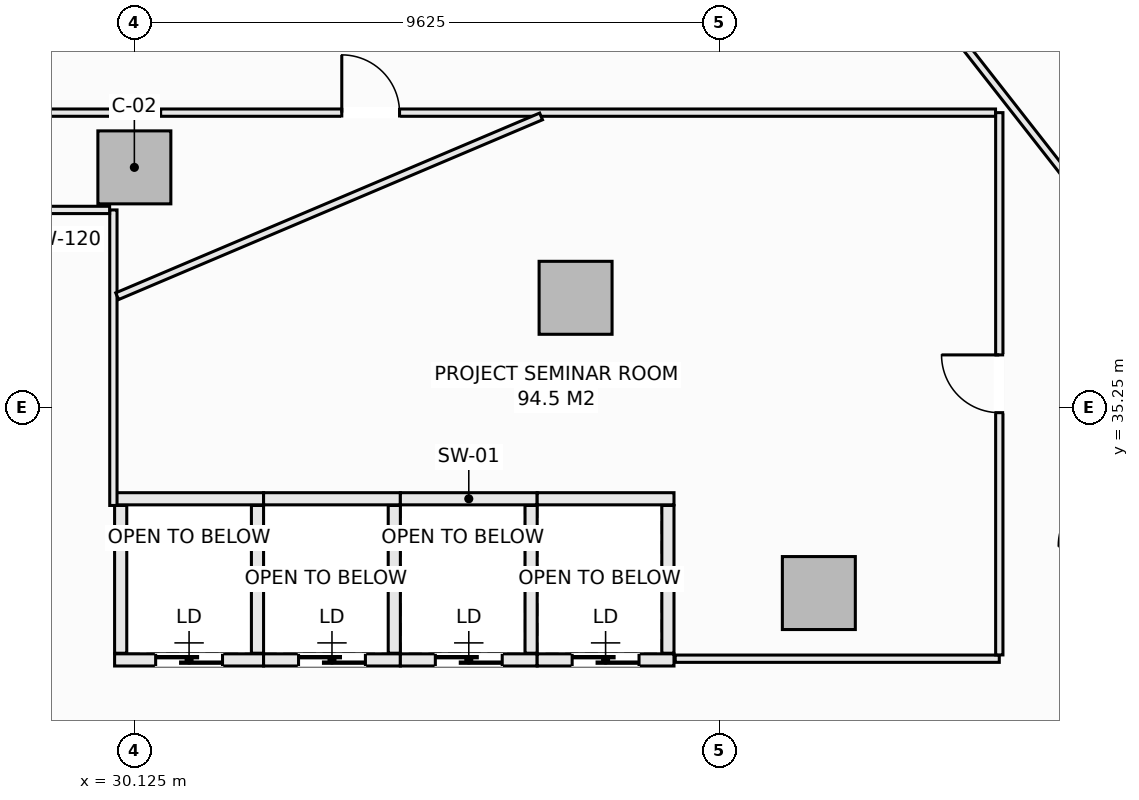
"""IFC4 building model, lengths in metres.
Left out: names, types, materials, properties, quantities, classifications, styles, units other than length and angle.
Written with IfcOpenShell. Run it as: python <this file> out.ifc"""

import sys

from ifc_helpers import new_model, si_unit, direction, frame, frame_2d, origin, origin_2d, place, context, subcontext, project, spatial, rectangle, extrude, element, fill, save


model = new_model("IFC4")
c1 = context("Model", 3, precision=1e-05, world=origin(), true_north=direction((0.0, 1.0)))
c2 = subcontext(c1, "Body", "Model", "MODEL_VIEW")
j1 = project(units=[si_unit("LENGTHUNIT", "METRE"), si_unit("PLANEANGLEUNIT", "RADIAN")], contexts=[c1])
p1 = place(None, origin())
s1 = spatial("IfcSite", under=j1, at=p1, CompositionType="ELEMENT")
p2 = place(p1, origin())
s2 = spatial("IfcBuilding", under=s1, at=p2, CompositionType="ELEMENT")
p3 = place(p2, frame((0.0, 0.0, 41.9)))
s3 = spatial("IfcBuildingStorey", under=s2, at=p3, CompositionType="ELEMENT", Elevation=41.9)
for number, where, z_axis, x_axis in (
    (1, (41.382, 32.199, -0.28), (0.0, 0.0, 1.0), (1.0, 0.0, 0.0)),
    (2, (37.382, 37.055, -0.28), (0.0, 0.0, 1.0), (1.0, 0.0, 0.0)),
    (3, (30.125, 39.2, -0.28), (0.0, 0.0, 1.0), (1.0, 0.0, 0.0)),
):
    element("IfcColumn", number, at=place(p3, frame(where, z_axis=z_axis, x_axis=x_axis)), inside=s3, PredefinedType="COLUMN", context=c2, shape_type="SweptSolid", body=[
        extrude(rectangle(XDim=1.2, YDim=1.2, at=origin_2d()), origin(), (0.0, 0.0, 1.0), 3.85),
    ])
p4 = place(p3, frame((29.8, 33.75, 0.0), z_axis=(0.0, 0.0, 1.0), x_axis=(1.0, 0.0, 0.0)))
e4 = element("IfcWall", 4, at=p4, inside=s3, PredefinedType="SOLIDWALL", context=c2, shape_type="SweptSolid", body=[
    extrude(rectangle(XDim=2.45, YDim=0.2, at=frame_2d((1.225, 0.0))), origin(), (0.0, 0.0, 1.0), 3.57),
])
p5 = place(p3, frame((29.8, 31.1, 0.0), z_axis=(0.0, 0.0, 1.0), x_axis=(1.0, 0.0, 0.0)))
e5 = element("IfcWall", 5, at=p5, inside=s3, PredefinedType="SOLIDWALL", context=c2, shape_type="SweptSolid", body=[
    extrude(rectangle(XDim=2.45, YDim=0.2, at=frame_2d((1.225, 0.0))), origin(), (0.0, 0.0, 1.0), 3.57),
])
p6 = place(p5, frame((0.675, 0.0, 0.0)))
e6 = element("IfcOpeningElement", 6, at=p6, cuts=e5, PredefinedType="OPENING", context=c2, shape_type="SweptSolid", body=[
    extrude(rectangle(XDim=1.1, YDim=2.2, at=frame_2d((0.55, 1.1))), frame((0.0, 0.11, 0.0), z_axis=(0.0, -1.0, 0.0), x_axis=(1.0, 0.0, 0.0)), (0.0, 0.0, 1.0), 0.22),
])
for number, where, z_axis, x_axis in (
    (7, (29.9, 31.21, 0.0), (0.0, 0.0, 1.0), (0.0, 1.0, 0.0)),
    (8, (32.15, 31.21, 0.0), (0.0, 0.0, 1.0), (0.0, 1.0, 0.0)),
):
    element("IfcWall", number, at=place(p3, frame(where, z_axis=z_axis, x_axis=x_axis)), inside=s3, PredefinedType="SOLIDWALL", context=c2, shape_type="SweptSolid", body=[
        extrude(rectangle(XDim=2.43, YDim=0.2, at=frame_2d((1.215, 0.0))), origin(), (0.0, 0.0, 1.0), 3.57),
    ])
p7 = place(p3, frame((32.25, 33.75, 0.0), z_axis=(0.0, 0.0, 1.0), x_axis=(1.0, 0.0, 0.0)))
e9 = element("IfcWall", 9, at=p7, inside=s3, PredefinedType="SOLIDWALL", context=c2, shape_type="SweptSolid", body=[
    extrude(rectangle(XDim=2.25, YDim=0.2, at=frame_2d((1.125, 0.0))), origin(), (0.0, 0.0, 1.0), 3.57),
])
p8 = place(p3, frame((32.25, 31.1, 0.0), z_axis=(0.0, 0.0, 1.0), x_axis=(1.0, 0.0, 0.0)))
e10 = element("IfcWall", 10, at=p8, inside=s3, PredefinedType="SOLIDWALL", context=c2, shape_type="SweptSolid", body=[
    extrude(rectangle(XDim=2.25, YDim=0.2, at=frame_2d((1.125, 0.0))), origin(), (0.0, 0.0, 1.0), 3.57),
])
p9 = place(p8, frame((0.575, 0.0, 0.0)))
e11 = element("IfcOpeningElement", 11, at=p9, cuts=e10, PredefinedType="OPENING", context=c2, shape_type="SweptSolid", body=[
    extrude(rectangle(XDim=1.1, YDim=2.2, at=frame_2d((0.55, 1.1))), frame((0.0, 0.11, 0.0), z_axis=(0.0, -1.0, 0.0), x_axis=(1.0, 0.0, 0.0)), (0.0, 0.0, 1.0), 0.22),
])
p10 = place(p3, frame((34.4, 31.21, 0.0), z_axis=(0.0, 0.0, 1.0), x_axis=(0.0, 1.0, 0.0)))
e12 = element("IfcWall", 12, at=p10, inside=s3, PredefinedType="SOLIDWALL", context=c2, shape_type="SweptSolid", body=[
    extrude(rectangle(XDim=2.43, YDim=0.2, at=frame_2d((1.215, 0.0))), origin(), (0.0, 0.0, 1.0), 3.57),
])
p11 = place(p3, frame((34.5, 33.75, 0.0), z_axis=(0.0, 0.0, 1.0), x_axis=(1.0, 0.0, 0.0)))
e13 = element("IfcWall", 13, at=p11, inside=s3, PredefinedType="SOLIDWALL", context=c2, shape_type="SweptSolid", body=[
    extrude(rectangle(XDim=2.25, YDim=0.2, at=frame_2d((1.125, 0.0))), origin(), (0.0, 0.0, 1.0), 3.57),
])
p12 = place(p3, frame((34.5, 31.1, 0.0), z_axis=(0.0, 0.0, 1.0), x_axis=(1.0, 0.0, 0.0)))
e14 = element("IfcWall", 14, at=p12, inside=s3, PredefinedType="SOLIDWALL", context=c2, shape_type="SweptSolid", body=[
    extrude(rectangle(XDim=2.25, YDim=0.2, at=frame_2d((1.125, 0.0))), origin(), (0.0, 0.0, 1.0), 3.57),
])
p13 = place(p12, frame((0.575, 0.0, 0.0)))
e15 = element("IfcOpeningElement", 15, at=p13, cuts=e14, PredefinedType="OPENING", context=c2, shape_type="SweptSolid", body=[
    extrude(rectangle(XDim=1.1, YDim=2.2, at=frame_2d((0.55, 1.1))), frame((0.0, 0.11, 0.0), z_axis=(0.0, -1.0, 0.0), x_axis=(1.0, 0.0, 0.0)), (0.0, 0.0, 1.0), 0.22),
])
p14 = place(p3, frame((36.65, 31.21, 0.0), z_axis=(0.0, 0.0, 1.0), x_axis=(0.0, 1.0, 0.0)))
e16 = element("IfcWall", 16, at=p14, inside=s3, PredefinedType="SOLIDWALL", context=c2, shape_type="SweptSolid", body=[
    extrude(rectangle(XDim=2.43, YDim=0.2, at=frame_2d((1.215, 0.0))), origin(), (0.0, 0.0, 1.0), 3.57),
])
p15 = place(p3, frame((36.75, 33.75, 0.0), z_axis=(0.0, 0.0, 1.0), x_axis=(1.0, 0.0, 0.0)))
e17 = element("IfcWall", 17, at=p15, inside=s3, PredefinedType="SOLIDWALL", context=c2, shape_type="SweptSolid", body=[
    extrude(rectangle(XDim=2.25, YDim=0.2, at=frame_2d((1.125, 0.0))), origin(), (0.0, 0.0, 1.0), 3.57),
])
p16 = place(p3, frame((36.75, 31.1, 0.0), z_axis=(0.0, 0.0, 1.0), x_axis=(1.0, 0.0, 0.0)))
e18 = element("IfcWall", 18, at=p16, inside=s3, PredefinedType="SOLIDWALL", context=c2, shape_type="SweptSolid", body=[
    extrude(rectangle(XDim=2.25, YDim=0.2, at=frame_2d((1.125, 0.0))), origin(), (0.0, 0.0, 1.0), 3.57),
])
p17 = place(p16, frame((0.575, 0.0, 0.0)))
e19 = element("IfcOpeningElement", 19, at=p17, cuts=e18, PredefinedType="OPENING", context=c2, shape_type="SweptSolid", body=[
    extrude(rectangle(XDim=1.1, YDim=2.2, at=frame_2d((0.55, 1.1))), frame((0.0, 0.11, 0.0), z_axis=(0.0, -1.0, 0.0), x_axis=(1.0, 0.0, 0.0)), (0.0, 0.0, 1.0), 0.22),
])
p18 = place(p3, frame((38.9, 31.21, 0.0), z_axis=(0.0, 0.0, 1.0), x_axis=(0.0, 1.0, 0.0)))
e20 = element("IfcWall", 20, at=p18, inside=s3, PredefinedType="SOLIDWALL", context=c2, shape_type="SweptSolid", body=[
    extrude(rectangle(XDim=2.43, YDim=0.2, at=frame_2d((1.215, 0.0))), origin(), (0.0, 0.0, 1.0), 3.57),
])
p19 = place(p3, frame((29.78, 33.64, 0.0), z_axis=(0.0, 0.0, 1.0), x_axis=(0.0, 1.0, 0.0)))
e21 = element("IfcWall", 21, at=p19, inside=s3, PredefinedType="PARTITIONING", context=c2, shape_type="SweptSolid", body=[
    extrude(rectangle(XDim=4.86, YDim=0.12, at=frame_2d((2.43, 0.0))), origin(), (0.0, 0.0, 1.0), 3.57),
])
p20 = place(p3, frame((39.02, 31.12, 0.0), z_axis=(0.0, 0.0, 1.0), x_axis=(1.0, 0.0, 0.0)))
e22 = element("IfcWall", 22, at=p20, inside=s3, PredefinedType="PARTITIONING", context=c2, shape_type="SweptSolid", body=[
    extrude(rectangle(XDim=5.33, YDim=0.12, at=frame_2d((2.665, 0.0))), origin(), (0.0, 0.0, 1.0), 3.57),
])
p21 = place(p3, frame((44.35, 31.182, 0.0), z_axis=(0.0, 0.0, 1.0), x_axis=(0.0, 1.0, 0.0)))
e23 = element("IfcWall", 23, at=p21, inside=s3, PredefinedType="PARTITIONING", context=c2, shape_type="SweptSolid", body=[
    extrude(rectangle(XDim=8.918, YDim=0.12, at=frame_2d((4.459, 0.0))), origin(), (0.0, 0.0, 1.0), 3.57),
])
p22 = place(p21, frame((3.984, 0.0, 0.0)))
e24 = element("IfcOpeningElement", 24, at=p22, cuts=e23, PredefinedType="OPENING", context=c2, shape_type="SweptSolid", body=[
    extrude(rectangle(XDim=0.95, YDim=2.1, at=frame_2d((0.475, 1.05))), frame((0.0, 0.07, 0.0), z_axis=(0.0, -1.0, 0.0), x_axis=(1.0, 0.0, 0.0)), (0.0, 0.0, 1.0), 0.14),
])
p23 = place(p3, frame((23.4, 40.1, 0.0), z_axis=(0.0, 0.0, 1.0), x_axis=(1.0, 0.0, 0.0)))
e25 = element("IfcWall", 25, at=p23, inside=s3, PredefinedType="PARTITIONING", context=c2, shape_type="SweptSolid", body=[
    extrude(rectangle(XDim=6.335, YDim=0.12, at=frame_2d((3.167, 0.0))), origin(), (0.0, 0.0, 1.0), 3.57),
])
p24 = place(p3, frame((30.557, 40.1, 0.0), z_axis=(0.0, 0.0, 1.0), x_axis=(1.0, 0.0, 0.0)))
e26 = element("IfcWall", 26, at=p24, inside=s3, PredefinedType="PARTITIONING", context=c2, shape_type="SweptSolid", body=[
    extrude(rectangle(XDim=13.731, YDim=0.12, at=frame_2d((6.866, 0.0))), origin(), (0.0, 0.0, 1.0), 3.57),
])
p25 = place(p24, frame((2.979, 0.0, 0.0)))
e27 = element("IfcOpeningElement", 27, at=p25, cuts=e26, PredefinedType="OPENING", context=c2, shape_type="SweptSolid", body=[
    extrude(rectangle(XDim=0.95, YDim=2.1, at=frame_2d((0.475, 1.05))), frame((0.0, 0.07, 0.0), z_axis=(0.0, -1.0, 0.0), x_axis=(1.0, 0.0, 0.0)), (0.0, 0.0, 1.0), 0.14),
])
p26 = place(p3, frame((43.137, 42.02, 0.0), z_axis=(0.0, 0.0, 1.0), x_axis=(0.616441660183, -0.787400583941, 0.0)))
e28 = element("IfcWall", 28, at=p26, inside=s3, PredefinedType="PARTITIONING", context=c2, shape_type="SweptSolid", body=[
    extrude(rectangle(XDim=5.083, YDim=0.12, at=frame_2d((2.541, 0.0))), origin(), (0.0, 0.0, 1.0), 3.57),
])
p27 = place(p3, frame((27.25, 38.5, 0.0), z_axis=(0.0, 0.0, 1.0), x_axis=(1.0, 0.0, 0.0)))
e29 = element("IfcWall", 29, at=p27, inside=s3, PredefinedType="PARTITIONING", context=c2, shape_type="SweptSolid", body=[
    extrude(rectangle(XDim=2.468, YDim=0.12, at=frame_2d((1.234, 0.0))), origin(), (0.0, 0.0, 1.0), 3.57),
])
p28 = place(p3, frame((29.842, 37.081, 0.0), z_axis=(0.0, 0.0, 1.0), x_axis=(0.920622518337, 0.390453811265, 0.0)))
e30 = element("IfcWall", 30, at=p28, inside=s3, PredefinedType="PARTITIONING", context=c2, shape_type="SweptSolid", body=[
    extrude(rectangle(XDim=7.573, YDim=0.12, at=frame_2d((3.787, 0.0))), origin(), (0.0, 0.0, 1.0), 3.57),
])
p29 = place(p6, origin())
e31 = element("IfcDoor", 31, at=p29, inside=s3, OperationType="SLIDING_TO_LEFT", PredefinedType="DOOR", context=c2, shape_type="SweptSolid", body=[
    extrude(rectangle(XDim=1.1, YDim=2.2, at=frame_2d((0.55, 1.1))), frame((0.0, 0.025, 0.0), z_axis=(0.0, -1.0, 0.0), x_axis=(1.0, 0.0, 0.0)), (0.0, 0.0, 1.0), 0.05),
])
fill(e6, e31)
p30 = place(p9, origin())
e32 = element("IfcDoor", 32, at=p30, inside=s3, OperationType="SLIDING_TO_LEFT", PredefinedType="DOOR", context=c2, shape_type="SweptSolid", body=[
    extrude(rectangle(XDim=1.1, YDim=2.2, at=frame_2d((0.55, 1.1))), frame((0.0, 0.025, 0.0), z_axis=(0.0, -1.0, 0.0), x_axis=(1.0, 0.0, 0.0)), (0.0, 0.0, 1.0), 0.05),
])
fill(e11, e32)
p31 = place(p13, origin())
e33 = element("IfcDoor", 33, at=p31, inside=s3, OperationType="SLIDING_TO_LEFT", PredefinedType="DOOR", context=c2, shape_type="SweptSolid", body=[
    extrude(rectangle(XDim=1.1, YDim=2.2, at=frame_2d((0.55, 1.1))), frame((0.0, 0.025, 0.0), z_axis=(0.0, -1.0, 0.0), x_axis=(1.0, 0.0, 0.0)), (0.0, 0.0, 1.0), 0.05),
])
fill(e15, e33)
p32 = place(p17, origin())
e34 = element("IfcDoor", 34, at=p32, inside=s3, OperationType="SLIDING_TO_LEFT", PredefinedType="DOOR", context=c2, shape_type="SweptSolid", body=[
    extrude(rectangle(XDim=1.1, YDim=2.2, at=frame_2d((0.55, 1.1))), frame((0.0, 0.025, 0.0), z_axis=(0.0, -1.0, 0.0), x_axis=(1.0, 0.0, 0.0)), (0.0, 0.0, 1.0), 0.05),
])
fill(e19, e34)
p33 = place(p22, origin())
e35 = element("IfcDoor", 35, at=p33, inside=s3, OperationType="SINGLE_SWING_RIGHT", PredefinedType="DOOR", context=c2, shape_type="SweptSolid", body=[
    extrude(rectangle(XDim=0.95, YDim=2.1, at=frame_2d((0.475, 1.05))), frame((0.0, 0.025, 0.0), z_axis=(0.0, -1.0, 0.0), x_axis=(1.0, 0.0, 0.0)), (0.0, 0.0, 1.0), 0.05),
])
fill(e24, e35)
p34 = place(p25, origin())
e36 = element("IfcDoor", 36, at=p34, inside=s3, OperationType="SINGLE_SWING_LEFT", PredefinedType="DOOR", context=c2, shape_type="SweptSolid", body=[
    extrude(rectangle(XDim=0.95, YDim=2.1, at=frame_2d((0.475, 1.05))), frame((0.0, 0.025, 0.0), z_axis=(0.0, -1.0, 0.0), x_axis=(1.0, 0.0, 0.0)), (0.0, 0.0, 1.0), 0.05),
])
fill(e27, e36)
save(model, sys.argv[1])
